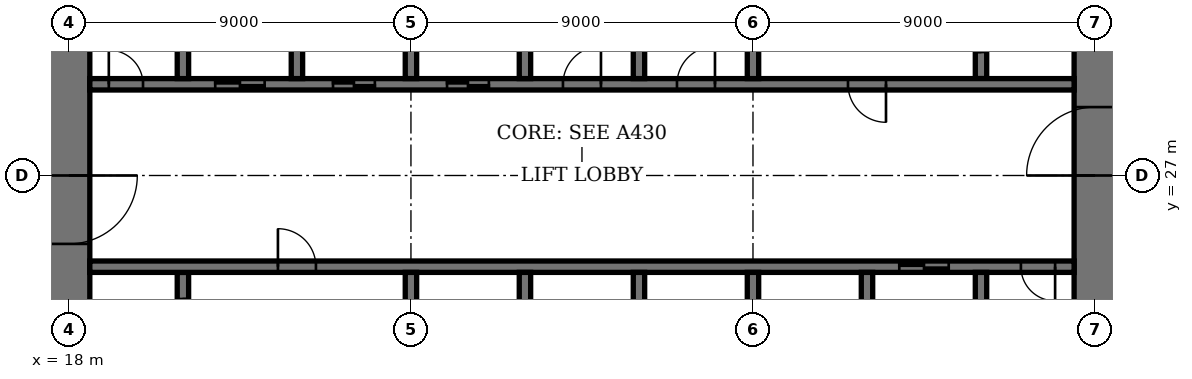
"""IFC4 building model, lengths in metres.
Left out: names, types, materials, properties, quantities, classifications, styles, units other than length and angle.
Written with IfcOpenShell. Run it as: python <this file> out.ifc"""

import sys

from ifc_helpers import new_model, si_unit, direction, frame, frame_2d, origin, place, context, subcontext, project, spatial, rectangle, extrude, element, fill, save


model = new_model("IFC4")
c1 = context("Model", 3, precision=1e-05, world=origin(), true_north=direction((0.0, 1.0)))
c2 = subcontext(c1, "Body", "Model", "MODEL_VIEW")
j1 = project(units=[si_unit("LENGTHUNIT", "METRE"), si_unit("PLANEANGLEUNIT", "RADIAN")], contexts=[c1])
p1 = place(None, origin())
s1 = spatial("IfcSite", under=j1, at=p1, CompositionType="ELEMENT")
p2 = place(p1, origin())
s2 = spatial("IfcBuilding", under=s1, at=p2, CompositionType="ELEMENT")
p3 = place(p2, frame((0.0, 0.0, 190.2)))
s3 = spatial("IfcBuildingStorey", under=s2, at=p3, CompositionType="ELEMENT", Elevation=190.2)
p4 = place(p3, frame((18.0, 35.45, 0.0), z_axis=(0.0, 0.0, 1.0), x_axis=(0.0, -1.0, 0.0)))
e1 = element("IfcWall", 1, at=p4, inside=s3, PredefinedType="SHEAR", context=c2, shape_type="SweptSolid", body=[
    extrude(rectangle(XDim=16.9, YDim=1.1, at=frame_2d((8.45, 0.0))), origin(), (0.0, 0.0, 1.0), 4.0),
])
p5 = place(p4, frame((8.45, 0.0, 0.0)))
e2 = element("IfcOpeningElement", 2, at=p5, cuts=e1, PredefinedType="OPENING", context=c2, shape_type="SweptSolid", body=[
    extrude(rectangle(XDim=1.8, YDim=2.4, at=frame_2d((0.9, 1.2))), frame((0.0, 0.56, 0.0), z_axis=(0.0, -1.0, 0.0), x_axis=(1.0, 0.0, 0.0)), (0.0, 0.0, 1.0), 1.12),
])
p6 = place(p3, frame((45.0, 18.55, 0.0), z_axis=(0.0, 0.0, 1.0), x_axis=(0.0, 1.0, 0.0)))
e3 = element("IfcWall", 3, at=p6, inside=s3, PredefinedType="SHEAR", context=c2, shape_type="SweptSolid", body=[
    extrude(rectangle(XDim=16.9, YDim=1.1, at=frame_2d((8.45, 0.0))), origin(), (0.0, 0.0, 1.0), 4.0),
])
p7 = place(p6, frame((8.45, 0.0, 0.0)))
e4 = element("IfcOpeningElement", 4, at=p7, cuts=e3, PredefinedType="OPENING", context=c2, shape_type="SweptSolid", body=[
    extrude(rectangle(XDim=1.8, YDim=2.4, at=frame_2d((0.9, 1.2))), frame((0.0, 0.56, 0.0), z_axis=(0.0, -1.0, 0.0), x_axis=(1.0, 0.0, 0.0)), (0.0, 0.0, 1.0), 1.12),
])
p8 = place(p3, frame((21.0, 21.95, 0.0), z_axis=(0.0, 0.0, 1.0), x_axis=(0.0, 1.0, 0.0)))
e5 = element("IfcWall", 5, at=p8, inside=s3, PredefinedType="SHEAR", context=c2, shape_type="SweptSolid", body=[
    extrude(rectangle(XDim=2.5, YDim=0.3, at=frame_2d((1.25, 0.0))), origin(), (0.0, 0.0, 1.0), 4.0),
])
p9 = place(p8, frame((0.7, 0.0, 0.0)))
e6 = element("IfcOpeningElement", 6, at=p9, cuts=e5, PredefinedType="OPENING", context=c2, shape_type="SweptSolid", body=[
    extrude(rectangle(XDim=1.1, YDim=2.4, at=frame_2d((0.55, 1.2))), frame((0.0, 0.16, 0.0), z_axis=(0.0, -1.0, 0.0), x_axis=(1.0, 0.0, 0.0)), (0.0, 0.0, 1.0), 0.32),
])
p10 = place(p3, frame((42.0, 29.55, 0.0), z_axis=(0.0, 0.0, 1.0), x_axis=(0.0, 1.0, 0.0)))
e7 = element("IfcWall", 7, at=p10, inside=s3, PredefinedType="SHEAR", context=c2, shape_type="SweptSolid", body=[
    extrude(rectangle(XDim=2.5, YDim=0.3, at=frame_2d((1.25, 0.0))), origin(), (0.0, 0.0, 1.0), 4.0),
])
p11 = place(p10, frame((0.7, 0.0, 0.0)))
e8 = element("IfcOpeningElement", 8, at=p11, cuts=e7, PredefinedType="OPENING", context=c2, shape_type="SweptSolid", body=[
    extrude(rectangle(XDim=1.1, YDim=2.4, at=frame_2d((0.55, 1.2))), frame((0.0, 0.16, 0.0), z_axis=(0.0, -1.0, 0.0), x_axis=(1.0, 0.0, 0.0)), (0.0, 0.0, 1.0), 0.32),
])
p12 = place(p3, frame((18.55, 24.6, 0.0), z_axis=(0.0, 0.0, 1.0), x_axis=(1.0, 0.0, 0.0)))
e9 = element("IfcWall", 9, at=p12, inside=s3, PredefinedType="SHEAR", context=c2, shape_type="SweptSolid", body=[
    extrude(rectangle(XDim=25.9, YDim=0.3, at=frame_2d((12.95, 0.0))), origin(), (0.0, 0.0, 1.0), 4.0),
])
p13 = place(p12, frame((4.95, 0.0, 0.0)))
e10 = element("IfcOpeningElement", 10, at=p13, cuts=e9, PredefinedType="OPENING", context=c2, shape_type="SweptSolid", body=[
    extrude(rectangle(XDim=1.0, YDim=2.4, at=frame_2d((0.5, 1.2))), frame((0.0, 0.16, 0.0), z_axis=(0.0, -1.0, 0.0), x_axis=(1.0, 0.0, 0.0)), (0.0, 0.0, 1.0), 0.32),
])
p14 = place(p12, frame((24.5, 0.0, 0.0)))
e11 = element("IfcOpeningElement", 11, at=p14, cuts=e9, PredefinedType="OPENING", context=c2, shape_type="SweptSolid", body=[
    extrude(rectangle(XDim=0.9, YDim=2.1, at=frame_2d((0.45, 1.05))), frame((0.0, 0.16, 0.0), z_axis=(0.0, -1.0, 0.0), x_axis=(1.0, 0.0, 0.0)), (0.0, 0.0, 1.0), 0.32),
])
p15 = place(p12, frame((21.3, 0.0, 0.0)))
e12 = element("IfcOpeningElement", 12, at=p15, cuts=e9, PredefinedType="OPENING", context=c2, shape_type="SweptSolid", body=[
    extrude(rectangle(XDim=1.3, YDim=2.4, at=frame_2d((0.65, 1.2))), frame((0.0, 0.16, 0.0), z_axis=(0.0, -1.0, 0.0), x_axis=(1.0, 0.0, 0.0)), (0.0, 0.0, 1.0), 0.32),
])
p16 = place(p3, frame((18.55, 29.4, 0.0), z_axis=(0.0, 0.0, 1.0), x_axis=(1.0, 0.0, 0.0)))
e13 = element("IfcWall", 13, at=p16, inside=s3, PredefinedType="SHEAR", context=c2, shape_type="SweptSolid", body=[
    extrude(rectangle(XDim=25.9, YDim=0.3, at=frame_2d((12.95, 0.0))), origin(), (0.0, 0.0, 1.0), 4.0),
])
p17 = place(p16, frame((19.95, 0.0, 0.0)))
e14 = element("IfcOpeningElement", 14, at=p17, cuts=e13, PredefinedType="OPENING", context=c2, shape_type="SweptSolid", body=[
    extrude(rectangle(XDim=1.0, YDim=2.4, at=frame_2d((0.5, 1.2))), frame((0.0, 0.16, 0.0), z_axis=(0.0, -1.0, 0.0), x_axis=(1.0, 0.0, 0.0)), (0.0, 0.0, 1.0), 0.32),
])
p18 = place(p16, frame((0.5, 0.0, 0.0)))
e15 = element("IfcOpeningElement", 15, at=p18, cuts=e13, PredefinedType="OPENING", context=c2, shape_type="SweptSolid", body=[
    extrude(rectangle(XDim=0.9, YDim=2.1, at=frame_2d((0.45, 1.05))), frame((0.0, 0.16, 0.0), z_axis=(0.0, -1.0, 0.0), x_axis=(1.0, 0.0, 0.0)), (0.0, 0.0, 1.0), 0.32),
])
p19 = place(p16, frame((15.45, 0.0, 0.0)))
e16 = element("IfcOpeningElement", 16, at=p19, cuts=e13, PredefinedType="OPENING", context=c2, shape_type="SweptSolid", body=[
    extrude(rectangle(XDim=1.0, YDim=2.4, at=frame_2d((0.5, 1.2))), frame((0.0, 0.16, 0.0), z_axis=(0.0, -1.0, 0.0), x_axis=(1.0, 0.0, 0.0)), (0.0, 0.0, 1.0), 0.32),
])
p20 = place(p16, frame((12.45, 0.0, 0.0)))
e17 = element("IfcOpeningElement", 17, at=p20, cuts=e13, PredefinedType="OPENING", context=c2, shape_type="SweptSolid", body=[
    extrude(rectangle(XDim=1.0, YDim=2.4, at=frame_2d((0.5, 1.2))), frame((0.0, 0.16, 0.0), z_axis=(0.0, -1.0, 0.0), x_axis=(1.0, 0.0, 0.0)), (0.0, 0.0, 1.0), 0.32),
])
p21 = place(p16, frame((9.4, 0.0, 0.0)))
e18 = element("IfcOpeningElement", 18, at=p21, cuts=e13, PredefinedType="OPENING", context=c2, shape_type="SweptSolid", body=[
    extrude(rectangle(XDim=1.1, YDim=2.4, at=frame_2d((0.55, 1.2))), frame((0.0, 0.16, 0.0), z_axis=(0.0, -1.0, 0.0), x_axis=(1.0, 0.0, 0.0)), (0.0, 0.0, 1.0), 0.32),
])
p22 = place(p16, frame((6.4, 0.0, 0.0)))
e19 = element("IfcOpeningElement", 19, at=p22, cuts=e13, PredefinedType="OPENING", context=c2, shape_type="SweptSolid", body=[
    extrude(rectangle(XDim=1.1, YDim=2.4, at=frame_2d((0.55, 1.2))), frame((0.0, 0.16, 0.0), z_axis=(0.0, -1.0, 0.0), x_axis=(1.0, 0.0, 0.0)), (0.0, 0.0, 1.0), 0.32),
])
p23 = place(p16, frame((3.3, 0.0, 0.0)))
e20 = element("IfcOpeningElement", 20, at=p23, cuts=e13, PredefinedType="OPENING", context=c2, shape_type="SweptSolid", body=[
    extrude(rectangle(XDim=1.3, YDim=2.4, at=frame_2d((0.65, 1.2))), frame((0.0, 0.16, 0.0), z_axis=(0.0, -1.0, 0.0), x_axis=(1.0, 0.0, 0.0)), (0.0, 0.0, 1.0), 0.32),
])
for number, where, z_axis, x_axis in (
    (21, (30.0, 21.75, 0.0), (0.0, 0.0, 1.0), (0.0, 1.0, 0.0)),
    (22, (33.0, 29.55, 0.0), (0.0, 0.0, 1.0), (0.0, 1.0, 0.0)),
    (23, (33.0, 21.75, 0.0), (0.0, 0.0, 1.0), (0.0, 1.0, 0.0)),
    (24, (30.0, 29.55, 0.0), (0.0, 0.0, 1.0), (0.0, 1.0, 0.0)),
    (25, (36.0, 21.75, 0.0), (0.0, 0.0, 1.0), (0.0, 1.0, 0.0)),
    (26, (27.0, 29.55, 0.0), (0.0, 0.0, 1.0), (0.0, 1.0, 0.0)),
):
    element("IfcWall", number, at=place(p3, frame(where, z_axis=z_axis, x_axis=x_axis)), inside=s3, PredefinedType="SHEAR", context=c2, shape_type="SweptSolid", body=[
        extrude(rectangle(XDim=2.7, YDim=0.3, at=frame_2d((1.35, 0.0))), origin(), (0.0, 0.0, 1.0), 4.0),
    ])
for number, where, z_axis, x_axis in (
    (27, (39.0, 18.55, 0.0), (0.0, 0.0, 1.0), (0.0, 1.0, 0.0)),
    (28, (24.0, 29.55, 0.0), (0.0, 0.0, 1.0), (0.0, 1.0, 0.0)),
):
    element("IfcWall", number, at=place(p3, frame(where, z_axis=z_axis, x_axis=x_axis)), inside=s3, PredefinedType="SHEAR", context=c2, shape_type="SweptSolid", body=[
        extrude(rectangle(XDim=5.9, YDim=0.3, at=frame_2d((2.95, 0.0))), origin(), (0.0, 0.0, 1.0), 4.0),
    ])
for number, where, z_axis, x_axis in (
    (29, (42.0, 21.75, 0.0), (0.0, 0.0, 1.0), (0.0, 1.0, 0.0)),
    (30, (21.0, 29.55, 0.0), (0.0, 0.0, 1.0), (0.0, 1.0, 0.0)),
):
    element("IfcWall", number, at=place(p3, frame(where, z_axis=z_axis, x_axis=x_axis)), inside=s3, PredefinedType="SHEAR", context=c2, shape_type="SweptSolid", body=[
        extrude(rectangle(XDim=2.7, YDim=0.3, at=frame_2d((1.35, 0.0))), origin(), (0.0, 0.0, 1.0), 4.0),
    ])
for number, where, z_axis, x_axis in (
    (31, (27.0, 21.6, 0.0), (0.0, 0.0, 1.0), (0.0, 1.0, 0.0)),
    (32, (36.0, 29.55, 0.0), (0.0, 0.0, 1.0), (0.0, 1.0, 0.0)),
):
    element("IfcWall", number, at=place(p3, frame(where, z_axis=z_axis, x_axis=x_axis)), inside=s3, PredefinedType="SHEAR", context=c2, shape_type="SweptSolid", body=[
        extrude(rectangle(XDim=2.85, YDim=0.3, at=frame_2d((1.425, 0.0))), origin(), (0.0, 0.0, 1.0), 4.0),
    ])
p24 = place(p5, origin())
e33 = element("IfcDoor", 33, at=p24, inside=s3, OperationType="DOUBLE_DOOR_DOUBLE_SWING", PredefinedType="DOOR", context=c2, shape_type="SweptSolid", body=[
    extrude(rectangle(XDim=1.8, YDim=2.4, at=frame_2d((0.9, 1.2))), frame((0.0, 0.03, 0.0), z_axis=(0.0, -1.0, 0.0), x_axis=(1.0, 0.0, 0.0)), (0.0, 0.0, 1.0), 0.06),
    extrude(rectangle(XDim=0.04, YDim=2.4, at=frame_2d((0.02, 1.2))), frame((0.0, 0.55, 0.0), z_axis=(0.0, -1.0, 0.0), x_axis=(1.0, 0.0, 0.0)), (0.0, 0.0, 1.0), 1.1),
    extrude(rectangle(XDim=0.04, YDim=2.4, at=frame_2d((1.78, 1.2))), frame((0.0, 0.55, 0.0), z_axis=(0.0, -1.0, 0.0), x_axis=(1.0, 0.0, 0.0)), (0.0, 0.0, 1.0), 1.1),
    extrude(rectangle(XDim=1.8, YDim=0.04, at=frame_2d((0.9, 2.38))), frame((0.0, 0.55, 0.0), z_axis=(0.0, -1.0, 0.0), x_axis=(1.0, 0.0, 0.0)), (0.0, 0.0, 1.0), 1.1),
])
fill(e2, e33)
p25 = place(p7, origin())
e34 = element("IfcDoor", 34, at=p25, inside=s3, OperationType="DOUBLE_DOOR_DOUBLE_SWING", PredefinedType="DOOR", context=c2, shape_type="SweptSolid", body=[
    extrude(rectangle(XDim=1.8, YDim=2.4, at=frame_2d((0.9, 1.2))), frame((0.0, 0.03, 0.0), z_axis=(0.0, -1.0, 0.0), x_axis=(1.0, 0.0, 0.0)), (0.0, 0.0, 1.0), 0.06),
    extrude(rectangle(XDim=0.04, YDim=2.4, at=frame_2d((0.02, 1.2))), frame((0.0, 0.55, 0.0), z_axis=(0.0, -1.0, 0.0), x_axis=(1.0, 0.0, 0.0)), (0.0, 0.0, 1.0), 1.1),
    extrude(rectangle(XDim=0.04, YDim=2.4, at=frame_2d((1.78, 1.2))), frame((0.0, 0.55, 0.0), z_axis=(0.0, -1.0, 0.0), x_axis=(1.0, 0.0, 0.0)), (0.0, 0.0, 1.0), 1.1),
    extrude(rectangle(XDim=1.8, YDim=0.04, at=frame_2d((0.9, 2.38))), frame((0.0, 0.55, 0.0), z_axis=(0.0, -1.0, 0.0), x_axis=(1.0, 0.0, 0.0)), (0.0, 0.0, 1.0), 1.1),
])
fill(e4, e34)
p26 = place(p13, origin())
e35 = element("IfcDoor", 35, at=p26, inside=s3, OperationType="SINGLE_SWING_RIGHT", PredefinedType="DOOR", context=c2, shape_type="SweptSolid", body=[
    extrude(rectangle(XDim=1.0, YDim=2.4, at=frame_2d((0.5, 1.2))), frame((0.0, 0.03, 0.0), z_axis=(0.0, -1.0, 0.0), x_axis=(1.0, 0.0, 0.0)), (0.0, 0.0, 1.0), 0.06),
])
fill(e10, e35)
p27 = place(p17, origin())
e36 = element("IfcDoor", 36, at=p27, inside=s3, OperationType="SINGLE_SWING_RIGHT", PredefinedType="DOOR", context=c2, shape_type="SweptSolid", body=[
    extrude(rectangle(XDim=1.0, YDim=2.4, at=frame_2d((0.5, 1.2))), frame((0.0, 0.03, 0.0), z_axis=(0.0, -1.0, 0.0), x_axis=(1.0, 0.0, 0.0)), (0.0, 0.0, 1.0), 0.06),
])
fill(e14, e36)
p28 = place(p14, origin())
e37 = element("IfcDoor", 37, at=p28, inside=s3, OperationType="SINGLE_SWING_RIGHT", PredefinedType="DOOR", context=c2, shape_type="SweptSolid", body=[
    extrude(rectangle(XDim=0.9, YDim=2.1, at=frame_2d((0.45, 1.05))), frame((0.0, 0.03, 0.0), z_axis=(0.0, -1.0, 0.0), x_axis=(1.0, 0.0, 0.0)), (0.0, 0.0, 1.0), 0.06),
])
fill(e11, e37)
p29 = place(p18, origin())
e38 = element("IfcDoor", 38, at=p29, inside=s3, OperationType="SINGLE_SWING_RIGHT", PredefinedType="DOOR", context=c2, shape_type="SweptSolid", body=[
    extrude(rectangle(XDim=0.9, YDim=2.1, at=frame_2d((0.45, 1.05))), frame((0.0, 0.03, 0.0), z_axis=(0.0, -1.0, 0.0), x_axis=(1.0, 0.0, 0.0)), (0.0, 0.0, 1.0), 0.06),
])
fill(e15, e38)
p30 = place(p19, origin())
e39 = element("IfcDoor", 39, at=p30, inside=s3, OperationType="SINGLE_SWING_LEFT", PredefinedType="DOOR", context=c2, shape_type="SweptSolid", body=[
    extrude(rectangle(XDim=1.0, YDim=2.4, at=frame_2d((0.5, 1.2))), frame((0.0, 0.03, 0.0), z_axis=(0.0, -1.0, 0.0), x_axis=(1.0, 0.0, 0.0)), (0.0, 0.0, 1.0), 0.06),
])
fill(e16, e39)
p31 = place(p20, origin())
e40 = element("IfcDoor", 40, at=p31, inside=s3, OperationType="SINGLE_SWING_LEFT", PredefinedType="DOOR", context=c2, shape_type="SweptSolid", body=[
    extrude(rectangle(XDim=1.0, YDim=2.4, at=frame_2d((0.5, 1.2))), frame((0.0, 0.03, 0.0), z_axis=(0.0, -1.0, 0.0), x_axis=(1.0, 0.0, 0.0)), (0.0, 0.0, 1.0), 0.06),
])
fill(e17, e40)
p32 = place(p21, origin())
e41 = element("IfcDoor", 41, at=p32, inside=s3, OperationType="DOUBLE_DOOR_SLIDING", PredefinedType="DOOR", context=c2, shape_type="SweptSolid", body=[
    extrude(rectangle(XDim=1.1, YDim=2.4, at=frame_2d((0.55, 1.2))), frame((0.0, 0.02, 0.0), z_axis=(0.0, -1.0, 0.0), x_axis=(1.0, 0.0, 0.0)), (0.0, 0.0, 1.0), 0.04),
])
fill(e18, e41)
p33 = place(p22, origin())
e42 = element("IfcDoor", 42, at=p33, inside=s3, OperationType="DOUBLE_DOOR_SLIDING", PredefinedType="DOOR", context=c2, shape_type="SweptSolid", body=[
    extrude(rectangle(XDim=1.1, YDim=2.4, at=frame_2d((0.55, 1.2))), frame((0.0, 0.02, 0.0), z_axis=(0.0, -1.0, 0.0), x_axis=(1.0, 0.0, 0.0)), (0.0, 0.0, 1.0), 0.04),
])
fill(e19, e42)
p34 = place(p15, origin())
e43 = element("IfcDoor", 43, at=p34, inside=s3, OperationType="DOUBLE_DOOR_SLIDING", PredefinedType="DOOR", context=c2, shape_type="SweptSolid", body=[
    extrude(rectangle(XDim=1.3, YDim=2.4, at=frame_2d((0.65, 1.2))), frame((0.0, 0.02, 0.0), z_axis=(0.0, -1.0, 0.0), x_axis=(1.0, 0.0, 0.0)), (0.0, 0.0, 1.0), 0.04),
])
fill(e12, e43)
p35 = place(p23, origin())
e44 = element("IfcDoor", 44, at=p35, inside=s3, OperationType="DOUBLE_DOOR_SLIDING", PredefinedType="DOOR", context=c2, shape_type="SweptSolid", body=[
    extrude(rectangle(XDim=1.3, YDim=2.4, at=frame_2d((0.65, 1.2))), frame((0.0, 0.02, 0.0), z_axis=(0.0, -1.0, 0.0), x_axis=(1.0, 0.0, 0.0)), (0.0, 0.0, 1.0), 0.04),
])
fill(e20, e44)
save(model, sys.argv[1])
